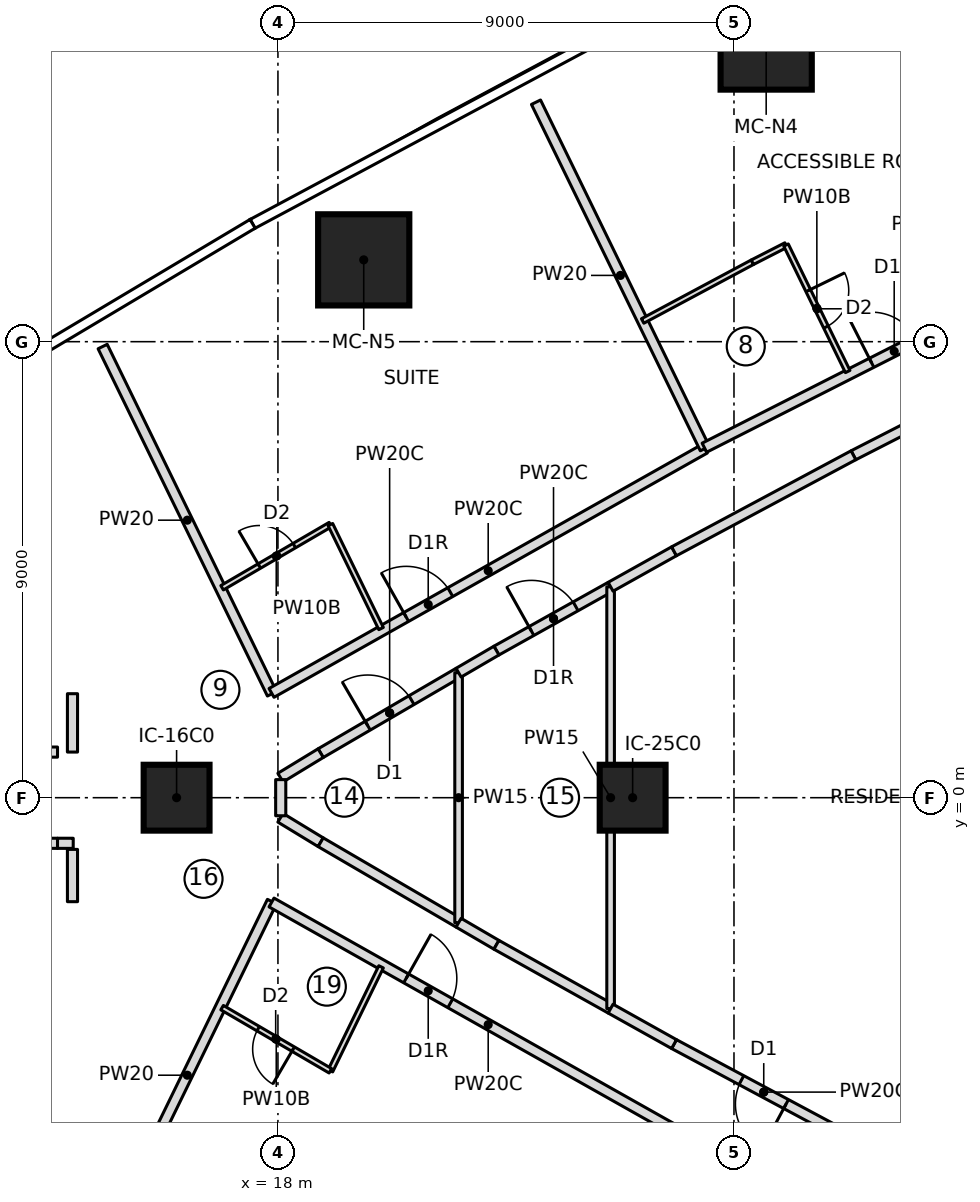
"""IFC4 building model, lengths in metres.
Left out: names, types, materials, properties, quantities, classifications, styles, units other than length and angle.
Written with IfcOpenShell. Run it as: python <this file> out.ifc"""

import sys

from ifc_helpers import new_model, si_unit, direction, frame, frame_2d, origin, origin_2d, place, context, subcontext, project, spatial, rectangle, extrude, element, fill, save


model = new_model("IFC4")
c1 = context("Model", 3, precision=1e-05, world=origin(), true_north=direction((0.0, 1.0)))
c2 = subcontext(c1, "Body", "Model", "MODEL_VIEW")
j1 = project(units=[si_unit("LENGTHUNIT", "METRE"), si_unit("PLANEANGLEUNIT", "RADIAN")], contexts=[c1])
p1 = place(None, origin())
s1 = spatial("IfcSite", under=j1, at=p1, CompositionType="ELEMENT")
p2 = place(p1, origin())
s2 = spatial("IfcBuilding", under=s1, at=p2, CompositionType="ELEMENT")
p3 = place(p2, frame((0.0, 0.0, 57.35)))
s3 = spatial("IfcBuildingStorey", under=s2, at=p3, CompositionType="ELEMENT", Elevation=57.35)
for number, where, z_axis, x_axis in (
    (1, (27.635, 14.874, 0.0), (0.0, 0.0, 1.0), (1.0, 0.0, 0.0)),
    (2, (19.693, 10.615, 0.0), (0.0, 0.0, 1.0), (1.0, 0.0, 0.0)),
):
    element("IfcColumn", number, at=place(p3, frame(where, z_axis=z_axis, x_axis=x_axis)), inside=s3, PredefinedType="COLUMN", context=c2, shape_type="SweptSolid", body=[
        extrude(rectangle(XDim=1.8, YDim=1.8, at=origin_2d()), origin(), (0.0, 0.0, 1.0), 3.55),
    ])
for number, where, z_axis, x_axis in (
    (3, (16.0, 0.0, 0.0), (0.0, 0.0, 1.0), (1.0, 0.0, 0.0)),
    (4, (25.0, 0.0, 0.0), (0.0, 0.0, 1.0), (1.0, 0.0, 0.0)),
):
    element("IfcColumn", number, at=place(p3, frame(where, z_axis=z_axis, x_axis=x_axis)), inside=s3, PredefinedType="COLUMN", context=c2, shape_type="SweptSolid", body=[
        extrude(rectangle(XDim=1.3, YDim=1.3, at=origin_2d()), origin(), (0.0, 0.0, 1.0), 3.55),
    ])
p4 = place(p3, frame((17.882, 2.05, 0.0), z_axis=(0.0, 0.0, 1.0), x_axis=(-0.438213564788, 0.898870887078, 0.0)))
e5 = element("IfcWall", 5, at=p4, inside=s3, PredefinedType="PARTITIONING", context=c2, shape_type="SweptSolid", body=[
    extrude(rectangle(XDim=7.625, YDim=0.2, at=frame_2d((3.813, 0.0))), origin(), (0.0, 0.0, 1.0), 3.25),
])
p5 = place(p3, frame((17.874, 2.068, 0.0), z_axis=(0.0, 0.0, 1.0), x_axis=(0.871078318876, 0.491144136057, 0.0)))
e6 = element("IfcWall", 6, at=p5, inside=s3, PredefinedType="PARTITIONING", context=c2, shape_type="SweptSolid", body=[
    extrude(rectangle(XDim=9.817, YDim=0.2, at=frame_2d((4.909, 0.0))), origin(), (0.0, 0.0, 1.0), 3.25),
])
p6 = place(p5, frame((3.05, 0.0, 0.0)))
e7 = element("IfcOpeningElement", 7, at=p6, cuts=e6, PredefinedType="OPENING", context=c2, shape_type="SweptSolid", body=[
    extrude(rectangle(XDim=1.0, YDim=2.1, at=frame_2d((0.5, 1.05))), frame((0.0, 0.11, 0.0), z_axis=(0.0, -1.0, 0.0), x_axis=(1.0, 0.0, 0.0)), (0.0, 0.0, 1.0), 0.22),
])
p7 = place(p3, frame((16.898, 4.144, 0.0), z_axis=(0.0, 0.0, 1.0), x_axis=(0.863707305865, 0.503993739837, 0.0)))
e8 = element("IfcWall", 8, at=p7, inside=s3, PredefinedType="PARTITIONING", context=c2, shape_type="SweptSolid", body=[
    extrude(rectangle(XDim=2.474, YDim=0.1, at=frame_2d((1.237, 0.0))), origin(), (0.0, 0.0, 1.0), 3.25),
])
p8 = place(p7, frame((0.85, 0.0, 0.0)))
e9 = element("IfcOpeningElement", 9, at=p8, cuts=e8, PredefinedType="OPENING", context=c2, shape_type="SweptSolid", body=[
    extrude(rectangle(XDim=0.8, YDim=2.1, at=frame_2d((0.4, 1.05))), frame((0.0, 0.06, 0.0), z_axis=(0.0, -1.0, 0.0), x_axis=(1.0, 0.0, 0.0)), (0.0, 0.0, 1.0), 0.12),
])
p9 = place(p3, frame((19.035, 5.39, 0.0), z_axis=(0.0, 0.0, 1.0), x_axis=(0.438122322582, -0.898915363344, 0.0)))
e10 = element("IfcWall", 10, at=p9, inside=s3, PredefinedType="PARTITIONING", context=c2, shape_type="SweptSolid", body=[
    extrude(rectangle(XDim=2.283, YDim=0.1, at=frame_2d((1.142, 0.0))), origin(), (0.0, 0.0, 1.0), 3.25),
])
p10 = place(p3, frame((26.425, 6.89, 0.0), z_axis=(0.0, 0.0, 1.0), x_axis=(-0.438202895602, 0.898876088394, 0.0)))
e11 = element("IfcWall", 11, at=p10, inside=s3, PredefinedType="PARTITIONING", context=c2, shape_type="SweptSolid", body=[
    extrude(rectangle(XDim=7.605, YDim=0.2, at=frame_2d((3.803, 0.0))), origin(), (0.0, 0.0, 1.0), 3.25),
])
p11 = place(p3, frame((26.417, 6.908, 0.0), z_axis=(0.0, 0.0, 1.0), x_axis=(0.891700643128, 0.452625632334, 0.0)))
e12 = element("IfcWall", 12, at=p11, inside=s3, PredefinedType="PARTITIONING", context=c2, shape_type="SweptSolid", body=[
    extrude(rectangle(XDim=9.801, YDim=0.2, at=frame_2d((4.901, 0.0))), origin(), (0.0, 0.0, 1.0), 3.25),
])
p12 = place(p11, frame((3.7, 0.0, 0.0)))
e13 = element("IfcOpeningElement", 13, at=p12, cuts=e12, PredefinedType="OPENING", context=c2, shape_type="SweptSolid", body=[
    extrude(rectangle(XDim=1.0, YDim=2.1, at=frame_2d((0.5, 1.05))), frame((0.0, 0.11, 0.0), z_axis=(0.0, -1.0, 0.0), x_axis=(1.0, 0.0, 0.0)), (0.0, 0.0, 1.0), 0.22),
])
p13 = place(p3, frame((25.198, 9.409, 0.0), z_axis=(0.0, 0.0, 1.0), x_axis=(0.881658684569, 0.471887660279, 0.0)))
e14 = element("IfcWall", 14, at=p13, inside=s3, PredefinedType="PARTITIONING", context=c2, shape_type="SweptSolid", body=[
    extrude(rectangle(XDim=2.457, YDim=0.1, at=frame_2d((1.228, 0.0))), origin(), (0.0, 0.0, 1.0), 3.25),
])
p14 = place(p3, frame((27.363, 10.568, 0.0), z_axis=(0.0, 0.0, 1.0), x_axis=(0.890195653003, 0.455578422858, 0.0)))
e15 = element("IfcWall", 15, at=p14, inside=s3, PredefinedType="PARTITIONING", context=c2, shape_type="SweptSolid", body=[
    extrude(rectangle(XDim=0.745, YDim=0.1, at=frame_2d((0.373, 0.0))), origin(), (0.0, 0.0, 1.0), 3.25),
])
p15 = place(p3, frame((28.027, 10.907, 0.0), z_axis=(0.0, 0.0, 1.0), x_axis=(0.438189818179, -0.898882463531, 0.0)))
e16 = element("IfcWall", 16, at=p15, inside=s3, PredefinedType="PARTITIONING", context=c2, shape_type="SweptSolid", body=[
    extrude(rectangle(XDim=2.777, YDim=0.1, at=frame_2d((1.389, 0.0))), origin(), (0.0, 0.0, 1.0), 3.25),
])
p16 = place(p15, frame((1.0, 0.0, 0.0)))
e17 = element("IfcOpeningElement", 17, at=p16, cuts=e16, PredefinedType="OPENING", context=c2, shape_type="SweptSolid", body=[
    extrude(rectangle(XDim=0.8, YDim=2.1, at=frame_2d((0.4, 1.05))), frame((0.0, 0.06, 0.0), z_axis=(0.0, -1.0, 0.0), x_axis=(1.0, 0.0, 0.0)), (0.0, 0.0, 1.0), 0.12),
])
p17 = place(p3, frame((14.541, -8.904, 0.0), z_axis=(0.0, 0.0, 1.0), x_axis=(0.438213564788, 0.898870887078, 0.0)))
e18 = element("IfcWall", 18, at=p17, inside=s3, PredefinedType="PARTITIONING", context=c2, shape_type="SweptSolid", body=[
    extrude(rectangle(XDim=7.625, YDim=0.2, at=frame_2d((3.813, 0.0))), origin(), (0.0, 0.0, 1.0), 3.25),
])
p18 = place(p3, frame((17.874, -2.068, 0.0), z_axis=(0.0, 0.0, 1.0), x_axis=(0.871078318876, -0.491144136057, 0.0)))
e19 = element("IfcWall", 19, at=p18, inside=s3, PredefinedType="PARTITIONING", context=c2, shape_type="SweptSolid", body=[
    extrude(rectangle(XDim=9.817, YDim=0.2, at=frame_2d((4.909, 0.0))), origin(), (0.0, 0.0, 1.0), 3.25),
])
p19 = place(p18, frame((3.05, 0.0, 0.0)))
e20 = element("IfcOpeningElement", 20, at=p19, cuts=e19, PredefinedType="OPENING", context=c2, shape_type="SweptSolid", body=[
    extrude(rectangle(XDim=1.0, YDim=2.1, at=frame_2d((0.5, 1.05))), frame((0.0, 0.11, 0.0), z_axis=(0.0, -1.0, 0.0), x_axis=(1.0, 0.0, 0.0)), (0.0, 0.0, 1.0), 0.22),
])
p20 = place(p3, frame((20.035, -3.338, 0.0), z_axis=(0.0, 0.0, 1.0), x_axis=(-0.438122322582, -0.898915363344, 0.0)))
e21 = element("IfcWall", 21, at=p20, inside=s3, PredefinedType="PARTITIONING", context=c2, shape_type="SweptSolid", body=[
    extrude(rectangle(XDim=2.283, YDim=0.1, at=frame_2d((1.142, 0.0))), origin(), (0.0, 0.0, 1.0), 3.25),
])
p21 = place(p3, frame((19.035, -5.39, 0.0), z_axis=(0.0, 0.0, 1.0), x_axis=(-0.863707305865, 0.503993739837, 0.0)))
e22 = element("IfcWall", 22, at=p21, inside=s3, PredefinedType="PARTITIONING", context=c2, shape_type="SweptSolid", body=[
    extrude(rectangle(XDim=2.474, YDim=0.1, at=frame_2d((1.237, 0.0))), origin(), (0.0, 0.0, 1.0), 3.25),
])
p22 = place(p21, frame((0.85, 0.0, 0.0)))
e23 = element("IfcOpeningElement", 23, at=p22, cuts=e22, PredefinedType="OPENING", context=c2, shape_type="SweptSolid", body=[
    extrude(rectangle(XDim=0.8, YDim=2.1, at=frame_2d((0.4, 1.05))), frame((0.0, 0.06, 0.0), z_axis=(0.0, -1.0, 0.0), x_axis=(1.0, 0.0, 0.0)), (0.0, 0.0, 1.0), 0.12),
])
p23 = place(p3, frame((18.844, 0.879, 0.0), z_axis=(0.0, 0.0, 1.0), x_axis=(0.86371145221, 0.503986634071, 0.0)))
e24 = element("IfcWall", 24, at=p23, inside=s3, PredefinedType="PARTITIONING", context=c2, shape_type="SweptSolid", body=[
    extrude(rectangle(XDim=3.151, YDim=0.2, at=frame_2d((1.576, 0.0))), origin(), (0.0, 0.0, 1.0), 3.25),
])
p24 = place(p23, frame((1.076, 0.0, 0.0)))
e25 = element("IfcOpeningElement", 25, at=p24, cuts=e24, PredefinedType="OPENING", context=c2, shape_type="SweptSolid", body=[
    extrude(rectangle(XDim=1.0, YDim=2.1, at=frame_2d((0.5, 1.05))), frame((0.0, 0.11, 0.0), z_axis=(0.0, -1.0, 0.0), x_axis=(1.0, 0.0, 0.0)), (0.0, 0.0, 1.0), 0.22),
])
for number, where, z_axis, x_axis in (
    (26, (18.844, -0.879, 0.0), (0.0, 0.0, 1.0), (-0.854, 0.52, 0.0)),
    (27, (18.05, 0.396, 0.0), (0.0, 0.0, 1.0), (0.854, 0.52, 0.0)),
):
    element("IfcWall", number, at=place(p3, frame(where, z_axis=z_axis, x_axis=x_axis)), inside=s3, PredefinedType="PARTITIONING", context=c2, shape_type="SweptSolid", body=[
        extrude(rectangle(XDim=0.929, YDim=0.2, at=frame_2d((0.464, 0.0))), origin(), (0.0, 0.0, 1.0), 3.25),
    ])
p25 = place(p3, frame((21.565, -2.467, 0.0), z_axis=(0.0, 0.0, 1.0), x_axis=(-0.86371145221, 0.503986634071, 0.0)))
e28 = element("IfcWall", 28, at=p25, inside=s3, PredefinedType="PARTITIONING", context=c2, shape_type="SweptSolid", body=[
    extrude(rectangle(XDim=3.151, YDim=0.2, at=frame_2d((1.576, 0.0))), origin(), (0.0, 0.0, 1.0), 3.25),
])
p26 = place(p3, frame((21.565, -2.467, 0.0), z_axis=(0.0, 0.0, 1.0), x_axis=(0.0, 1.0, 0.0)))
e29 = element("IfcWall", 29, at=p26, inside=s3, PredefinedType="PARTITIONING", context=c2, shape_type="SweptSolid", body=[
    extrude(rectangle(XDim=4.935, YDim=0.15, at=frame_2d((2.467, 0.0))), origin(), (0.0, 0.0, 1.0), 3.25),
])
p27 = place(p3, frame((22.312, 2.903, 0.0), z_axis=(0.0, 0.0, 1.0), x_axis=(0.872797752414, 0.488082045748, 0.0)))
e30 = element("IfcWall", 30, at=p27, inside=s3, PredefinedType="PARTITIONING", context=c2, shape_type="SweptSolid", body=[
    extrude(rectangle(XDim=2.582, YDim=0.2, at=frame_2d((1.291, 0.0))), origin(), (0.0, 0.0, 1.0), 3.25),
])
p28 = place(p27, frame((0.791, 0.0, 0.0)))
e31 = element("IfcOpeningElement", 31, at=p28, cuts=e30, PredefinedType="OPENING", context=c2, shape_type="SweptSolid", body=[
    extrude(rectangle(XDim=1.0, YDim=2.1, at=frame_2d((0.5, 1.05))), frame((0.0, 0.11, 0.0), z_axis=(0.0, -1.0, 0.0), x_axis=(1.0, 0.0, 0.0)), (0.0, 0.0, 1.0), 0.22),
])
for number, where, z_axis, x_axis in (
    (32, (22.312, -2.903, 0.0), (0.0, 0.0, 1.0), (-0.864, 0.504, 0.0)),
    (33, (21.565, 2.467, 0.0), (0.0, 0.0, 1.0), (0.864, 0.504, 0.0)),
):
    element("IfcWall", number, at=place(p3, frame(where, z_axis=z_axis, x_axis=x_axis)), inside=s3, PredefinedType="PARTITIONING", context=c2, shape_type="SweptSolid", body=[
        extrude(rectangle(XDim=0.865, YDim=0.2, at=frame_2d((0.432, 0.0))), origin(), (0.0, 0.0, 1.0), 3.25),
    ])
p29 = place(p3, frame((24.565, -4.163, 0.0), z_axis=(0.0, 0.0, 1.0), x_axis=(-0.872797752414, 0.488082045748, 0.0)))
e34 = element("IfcWall", 34, at=p29, inside=s3, PredefinedType="PARTITIONING", context=c2, shape_type="SweptSolid", body=[
    extrude(rectangle(XDim=2.582, YDim=0.2, at=frame_2d((1.291, 0.0))), origin(), (0.0, 0.0, 1.0), 3.25),
])
p30 = place(p3, frame((24.565, -4.163, 0.0), z_axis=(0.0, 0.0, 1.0), x_axis=(0.0, 1.0, 0.0)))
e35 = element("IfcWall", 35, at=p30, inside=s3, PredefinedType="PARTITIONING", context=c2, shape_type="SweptSolid", body=[
    extrude(rectangle(XDim=8.326, YDim=0.15, at=frame_2d((4.163, 0.0))), origin(), (0.0, 0.0, 1.0), 3.25),
])
p31 = place(p3, frame((29.357, -6.758, 0.0), z_axis=(0.0, 0.0, 1.0), x_axis=(-0.881655245922, 0.471894084874, 0.0)))
e36 = element("IfcWall", 36, at=p31, inside=s3, PredefinedType="PARTITIONING", context=c2, shape_type="SweptSolid", body=[
    extrude(rectangle(XDim=4.016, YDim=0.2, at=frame_2d((2.008, 0.0))), origin(), (0.0, 0.0, 1.0), 3.25),
])
p32 = place(p31, frame((1.508, 0.0, 0.0)))
e37 = element("IfcOpeningElement", 37, at=p32, cuts=e36, PredefinedType="OPENING", context=c2, shape_type="SweptSolid", body=[
    extrude(rectangle(XDim=1.0, YDim=2.1, at=frame_2d((0.5, 1.05))), frame((0.0, 0.11, 0.0), z_axis=(0.0, -1.0, 0.0), x_axis=(1.0, 0.0, 0.0)), (0.0, 0.0, 1.0), 0.22),
])
p33 = place(p3, frame((29.357, 6.758, 0.0), z_axis=(0.0, 0.0, 1.0), x_axis=(0.890213377055, 0.455543788579, 0.0)))
e38 = element("IfcWall", 38, at=p33, inside=s3, PredefinedType="PARTITIONING", context=c2, shape_type="SweptSolid", body=[
    extrude(rectangle(XDim=2.912, YDim=0.2, at=frame_2d((1.456, 0.0))), origin(), (0.0, 0.0, 1.0), 3.25),
])
for number, where, z_axis, x_axis in (
    (39, (25.817, -4.863, 0.0), (0.0, 0.0, 1.0), (-0.873, 0.488, 0.0)),
    (40, (24.565, 4.163, 0.0), (0.0, 0.0, 1.0), (0.873, 0.488, 0.0)),
):
    element("IfcWall", number, at=place(p3, frame(where, z_axis=z_axis, x_axis=x_axis)), inside=s3, PredefinedType="PARTITIONING", context=c2, shape_type="SweptSolid", body=[
        extrude(rectangle(XDim=1.434, YDim=0.2, at=frame_2d((0.717, 0.0))), origin(), (0.0, 0.0, 1.0), 3.25),
    ])
p34 = place(p3, frame((25.817, 4.863, 0.0), z_axis=(0.0, 0.0, 1.0), x_axis=(0.881655245922, 0.471894084874, 0.0)))
e41 = element("IfcWall", 41, at=p34, inside=s3, PredefinedType="PARTITIONING", context=c2, shape_type="SweptSolid", body=[
    extrude(rectangle(XDim=4.016, YDim=0.2, at=frame_2d((2.008, 0.0))), origin(), (0.0, 0.0, 1.0), 3.25),
])
p35 = place(p3, frame((4.977, 0.9, 0.0), z_axis=(0.0, 0.0, 1.0), x_axis=(1.0, 0.0, 0.0)))
e42 = element("IfcWall", 42, at=p35, inside=s3, PredefinedType="PARTITIONING", context=c2, shape_type="SweptSolid", body=[
    extrude(rectangle(XDim=8.673, YDim=0.2, at=frame_2d((4.336, 0.0))), origin(), (0.0, 0.0, 1.0), 3.25),
])
p36 = place(p35, frame((4.345, 0.0, 0.0)))
e43 = element("IfcOpeningElement", 43, at=p36, cuts=e42, PredefinedType="OPENING", context=c2, shape_type="SweptSolid", body=[
    extrude(rectangle(XDim=1.0, YDim=2.1, at=frame_2d((0.5, 1.05))), frame((0.0, 0.11, 0.0), z_axis=(0.0, -1.0, 0.0), x_axis=(1.0, 0.0, 0.0)), (0.0, 0.0, 1.0), 0.22),
])
p37 = place(p3, frame((4.977, -0.9, 0.0), z_axis=(0.0, 0.0, 1.0), x_axis=(1.0, 0.0, 0.0)))
e44 = element("IfcWall", 44, at=p37, inside=s3, PredefinedType="PARTITIONING", context=c2, shape_type="SweptSolid", body=[
    extrude(rectangle(XDim=8.673, YDim=0.2, at=frame_2d((4.336, 0.0))), origin(), (0.0, 0.0, 1.0), 3.25),
])
p38 = place(p37, frame((4.345, 0.0, 0.0)))
e45 = element("IfcOpeningElement", 45, at=p38, cuts=e44, PredefinedType="OPENING", context=c2, shape_type="SweptSolid", body=[
    extrude(rectangle(XDim=1.0, YDim=2.1, at=frame_2d((0.5, 1.05))), frame((0.0, 0.11, 0.0), z_axis=(0.0, -1.0, 0.0), x_axis=(1.0, 0.0, 0.0)), (0.0, 0.0, 1.0), 0.22),
])
p39 = place(p3, frame((18.055, -0.357, 0.0), z_axis=(0.0, 0.0, 1.0), x_axis=(0.0, 1.0, 0.0)))
e46 = element("IfcWall", 46, at=p39, inside=s3, PredefinedType="PARTITIONING", context=c2, shape_type="SweptSolid", body=[
    extrude(rectangle(XDim=0.713, YDim=0.2, at=frame_2d((0.357, 0.0))), origin(), (0.0, 0.0, 1.0), 3.25),
])
p40 = place(p3, frame((13.946, 2.052, 0.0), z_axis=(0.0, 0.0, 1.0), x_axis=(-0.000423818568, -0.999999910189, 0.0)))
e47 = element("IfcWall", 47, at=p40, inside=s3, PredefinedType="PARTITIONING", context=c2, shape_type="SweptSolid", body=[
    extrude(rectangle(XDim=1.152, YDim=0.2, at=frame_2d((0.576, 0.0))), origin(), (0.0, 0.0, 1.0), 3.25),
])
p41 = place(p3, frame((13.65, -0.9, 0.0), z_axis=(0.0, 0.0, 1.0), x_axis=(0.99999876, -0.001574801197, 0.0)))
e48 = element("IfcWall", 48, at=p41, inside=s3, PredefinedType="PARTITIONING", context=c2, shape_type="SweptSolid", body=[
    extrude(rectangle(XDim=0.31, YDim=0.2, at=frame_2d((0.155, 0.0))), origin(), (0.0, 0.0, 1.0), 3.25),
])
p42 = place(p3, frame((13.945, -1.021, 0.0), z_axis=(0.0, 0.0, 1.0), x_axis=(0.000473148752, -0.999999888065, 0.0)))
e49 = element("IfcWall", 49, at=p42, inside=s3, PredefinedType="PARTITIONING", context=c2, shape_type="SweptSolid", body=[
    extrude(rectangle(XDim=1.032, YDim=0.2, at=frame_2d((0.516, 0.0))), origin(), (0.0, 0.0, 1.0), 3.25),
])
p43 = place(p8, origin())
e50 = element("IfcDoor", 50, at=p43, inside=s3, OperationType="SINGLE_SWING_LEFT", PredefinedType="DOOR", context=c2, shape_type="SweptSolid", body=[
    extrude(rectangle(XDim=0.8, YDim=2.1, at=frame_2d((0.4, 1.05))), frame((0.0, 0.025, 0.0), z_axis=(0.0, -1.0, 0.0), x_axis=(1.0, 0.0, 0.0)), (0.0, 0.0, 1.0), 0.05),
])
fill(e9, e50)
p44 = place(p6, origin())
e51 = element("IfcDoor", 51, at=p44, inside=s3, OperationType="SINGLE_SWING_RIGHT", PredefinedType="DOOR", context=c2, shape_type="SweptSolid", body=[
    extrude(rectangle(XDim=1.0, YDim=2.1, at=frame_2d((0.5, 1.05))), frame((0.0, 0.025, 0.0), z_axis=(0.0, -1.0, 0.0), x_axis=(1.0, 0.0, 0.0)), (0.0, 0.0, 1.0), 0.05),
])
fill(e7, e51)
p45 = place(p16, origin())
e52 = element("IfcDoor", 52, at=p45, inside=s3, OperationType="SINGLE_SWING_LEFT", PredefinedType="DOOR", context=c2, shape_type="SweptSolid", body=[
    extrude(rectangle(XDim=0.8, YDim=2.1, at=frame_2d((0.4, 1.05))), frame((0.0, 0.025, 0.0), z_axis=(0.0, -1.0, 0.0), x_axis=(1.0, 0.0, 0.0)), (0.0, 0.0, 1.0), 0.05),
])
fill(e17, e52)
p46 = place(p12, origin())
e53 = element("IfcDoor", 53, at=p46, inside=s3, OperationType="SINGLE_SWING_RIGHT", PredefinedType="DOOR", context=c2, shape_type="SweptSolid", body=[
    extrude(rectangle(XDim=1.0, YDim=2.1, at=frame_2d((0.5, 1.05))), frame((0.0, 0.025, 0.0), z_axis=(0.0, -1.0, 0.0), x_axis=(1.0, 0.0, 0.0)), (0.0, 0.0, 1.0), 0.05),
])
fill(e13, e53)
p47 = place(p22, origin())
e54 = element("IfcDoor", 54, at=p47, inside=s3, OperationType="SINGLE_SWING_LEFT", PredefinedType="DOOR", context=c2, shape_type="SweptSolid", body=[
    extrude(rectangle(XDim=0.8, YDim=2.1, at=frame_2d((0.4, 1.05))), frame((0.0, 0.025, 0.0), z_axis=(0.0, -1.0, 0.0), x_axis=(1.0, 0.0, 0.0)), (0.0, 0.0, 1.0), 0.05),
])
fill(e23, e54)
p48 = place(p19, origin())
e55 = element("IfcDoor", 55, at=p48, inside=s3, OperationType="SINGLE_SWING_RIGHT", PredefinedType="DOOR", context=c2, shape_type="SweptSolid", body=[
    extrude(rectangle(XDim=1.0, YDim=2.1, at=frame_2d((0.5, 1.05))), frame((0.0, 0.025, 0.0), z_axis=(0.0, -1.0, 0.0), x_axis=(1.0, 0.0, 0.0)), (0.0, 0.0, 1.0), 0.05),
])
fill(e20, e55)
p49 = place(p24, origin())
e56 = element("IfcDoor", 56, at=p49, inside=s3, OperationType="SINGLE_SWING_LEFT", PredefinedType="DOOR", context=c2, shape_type="SweptSolid", body=[
    extrude(rectangle(XDim=1.0, YDim=2.1, at=frame_2d((0.5, 1.05))), frame((0.0, 0.025, 0.0), z_axis=(0.0, -1.0, 0.0), x_axis=(1.0, 0.0, 0.0)), (0.0, 0.0, 1.0), 0.05),
])
fill(e25, e56)
p50 = place(p28, origin())
e57 = element("IfcDoor", 57, at=p50, inside=s3, OperationType="SINGLE_SWING_RIGHT", PredefinedType="DOOR", context=c2, shape_type="SweptSolid", body=[
    extrude(rectangle(XDim=1.0, YDim=2.1, at=frame_2d((0.5, 1.05))), frame((0.0, 0.025, 0.0), z_axis=(0.0, -1.0, 0.0), x_axis=(1.0, 0.0, 0.0)), (0.0, 0.0, 1.0), 0.05),
])
fill(e31, e57)
p51 = place(p32, origin())
e58 = element("IfcDoor", 58, at=p51, inside=s3, OperationType="SINGLE_SWING_LEFT", PredefinedType="DOOR", context=c2, shape_type="SweptSolid", body=[
    extrude(rectangle(XDim=1.0, YDim=2.1, at=frame_2d((0.5, 1.05))), frame((0.0, 0.025, 0.0), z_axis=(0.0, -1.0, 0.0), x_axis=(1.0, 0.0, 0.0)), (0.0, 0.0, 1.0), 0.05),
])
fill(e37, e58)
save(model, sys.argv[1])
